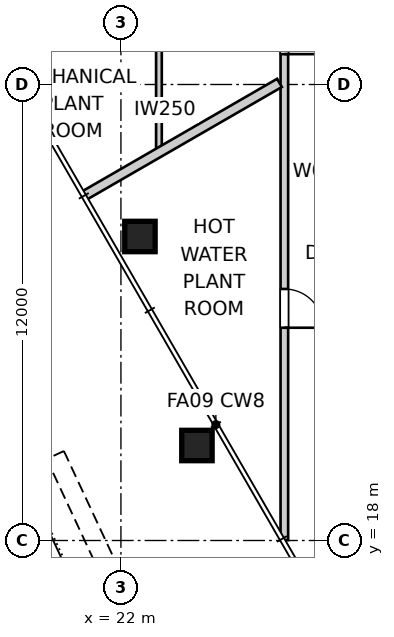
"""IFC4 building model, lengths in metres.
Left out: names, types, materials, properties, quantities, classifications, styles, units other than length and angle.
Written with IfcOpenShell. Run it as: python <this file> out.ifc"""

import sys

from ifc_helpers import new_model, si_unit, direction, frame, frame_2d, origin, origin_2d, place, context, subcontext, project, spatial, rectangle, extrude, element, fill, save


model = new_model("IFC4")
c1 = context("Model", 3, precision=1e-05, world=origin(), true_north=direction((0.0, 1.0)))
c2 = subcontext(c1, "Body", "Model", "MODEL_VIEW")
j1 = project(units=[si_unit("LENGTHUNIT", "METRE"), si_unit("PLANEANGLEUNIT", "RADIAN")], contexts=[c1])
p1 = place(None, origin())
s1 = spatial("IfcSite", under=j1, at=p1, CompositionType="ELEMENT")
p2 = place(p1, origin())
s2 = spatial("IfcBuilding", under=s1, at=p2, CompositionType="ELEMENT")
p3 = place(p2, frame((0.0, 0.0, 203.2)))
s3 = spatial("IfcBuildingStorey", under=s2, at=p3, CompositionType="ELEMENT", Elevation=203.2)
for number, where, z_axis, x_axis in (
    (1, (22.5, 26.0, 0.0), (0.0, 0.0, 1.0), (1.0, 0.0, 0.0)),
    (2, (24.0, 20.5, 0.0), (0.0, 0.0, 1.0), (1.0, 0.0, 0.0)),
):
    element("IfcColumn", number, at=place(p3, frame(where, z_axis=z_axis, x_axis=x_axis)), inside=s3, PredefinedType="COLUMN", context=c2, shape_type="SweptSolid", body=[
        extrude(rectangle(XDim=0.8, YDim=0.8, at=origin_2d()), origin(), (0.0, 0.0, 1.0), 5.0),
    ])
p4 = place(p3, frame((26.3, 42.713, 0.0), z_axis=(0.0, 0.0, 1.0), x_axis=(0.0, -1.0, 0.0)))
e3 = element("IfcWall", 3, at=p4, inside=s3, PredefinedType="PARTITIONING", context=c2, shape_type="SweptSolid", body=[
    extrude(rectangle(XDim=24.704, YDim=0.2, at=frame_2d((12.352, 0.0))), origin(), (0.0, 0.0, 1.0), 4.85),
])
p5 = place(p4, frame((18.094, 0.0, 0.0)))
e4 = element("IfcOpeningElement", 4, at=p5, cuts=e3, PredefinedType="OPENING", context=c2, shape_type="SweptSolid", body=[
    extrude(rectangle(XDim=1.02, YDim=2.34, at=frame_2d((0.51, 1.17))), frame((0.0, 0.11, 0.0), z_axis=(0.0, -1.0, 0.0), x_axis=(1.0, 0.0, 0.0)), (0.0, 0.0, 1.0), 0.22),
])
p6 = place(p4, frame((2.642, 0.0, 0.0)))
e5 = element("IfcOpeningElement", 5, at=p6, cuts=e3, PredefinedType="OPENING", context=c2, shape_type="SweptSolid", body=[
    extrude(rectangle(XDim=1.02, YDim=2.34, at=frame_2d((0.51, 1.17))), frame((0.0, 0.11, 0.0), z_axis=(0.0, -1.0, 0.0), x_axis=(1.0, 0.0, 0.0)), (0.0, 0.0, 1.0), 0.22),
])
p7 = place(p4, frame((7.534, 0.0, 0.0)))
e6 = element("IfcOpeningElement", 6, at=p7, cuts=e3, PredefinedType="OPENING", context=c2, shape_type="SweptSolid", body=[
    extrude(rectangle(XDim=1.02, YDim=2.34, at=frame_2d((0.51, 1.17))), frame((0.0, 0.11, 0.0), z_axis=(0.0, -1.0, 0.0), x_axis=(1.0, 0.0, 0.0)), (0.0, 0.0, 1.0), 0.22),
])
p8 = place(p4, frame((10.894, 0.0, 0.0)))
e7 = element("IfcOpeningElement", 7, at=p8, cuts=e3, PredefinedType="OPENING", context=c2, shape_type="SweptSolid", body=[
    extrude(rectangle(XDim=1.02, YDim=2.34, at=frame_2d((0.51, 1.17))), frame((0.0, 0.11, 0.0), z_axis=(0.0, -1.0, 0.0), x_axis=(1.0, 0.0, 0.0)), (0.0, 0.0, 1.0), 0.22),
])
p9 = place(p3, frame((21.023, 27.069, 0.0), z_axis=(0.0, 0.0, 1.0), x_axis=(0.866013262469, 0.500021028785, 0.0)))
e8 = element("IfcWall", 8, at=p9, inside=s3, PredefinedType="PARTITIONING", context=c2, shape_type="SweptSolid", body=[
    extrude(rectangle(XDim=5.946, YDim=0.25, at=frame_2d((2.973, 0.0))), origin(), (0.0, 0.0, 1.0), 4.85),
])
p10 = place(p3, frame((23.0, 28.21, 0.0), z_axis=(0.0, 0.0, 1.0), x_axis=(0.0, 1.0, 0.0)))
e9 = element("IfcWall", 9, at=p10, inside=s3, PredefinedType="SOLIDWALL", context=c2, shape_type="SweptSolid", body=[
    extrude(rectangle(XDim=6.778, YDim=0.15, at=frame_2d((3.389, 0.0))), origin(), (0.0, 0.0, 1.0), 4.85),
])
p11 = place(p5, origin())
e10 = element("IfcDoor", 10, at=p11, inside=s3, OperationType="SINGLE_SWING_RIGHT", PredefinedType="DOOR", context=c2, shape_type="SweptSolid", body=[
    extrude(rectangle(XDim=1.02, YDim=2.34, at=frame_2d((0.51, 1.17))), frame((0.0, 0.025, 0.0), z_axis=(0.0, -1.0, 0.0), x_axis=(1.0, 0.0, 0.0)), (0.0, 0.0, 1.0), 0.05),
])
fill(e4, e10)
p12 = place(p8, origin())
e11 = element("IfcDoor", 11, at=p12, inside=s3, OperationType="SINGLE_SWING_RIGHT", PredefinedType="DOOR", context=c2, shape_type="SweptSolid", body=[
    extrude(rectangle(XDim=1.02, YDim=2.34, at=frame_2d((0.51, 1.17))), frame((0.0, 0.025, 0.0), z_axis=(0.0, -1.0, 0.0), x_axis=(1.0, 0.0, 0.0)), (0.0, 0.0, 1.0), 0.05),
])
fill(e7, e11)
save(model, sys.argv[1])
